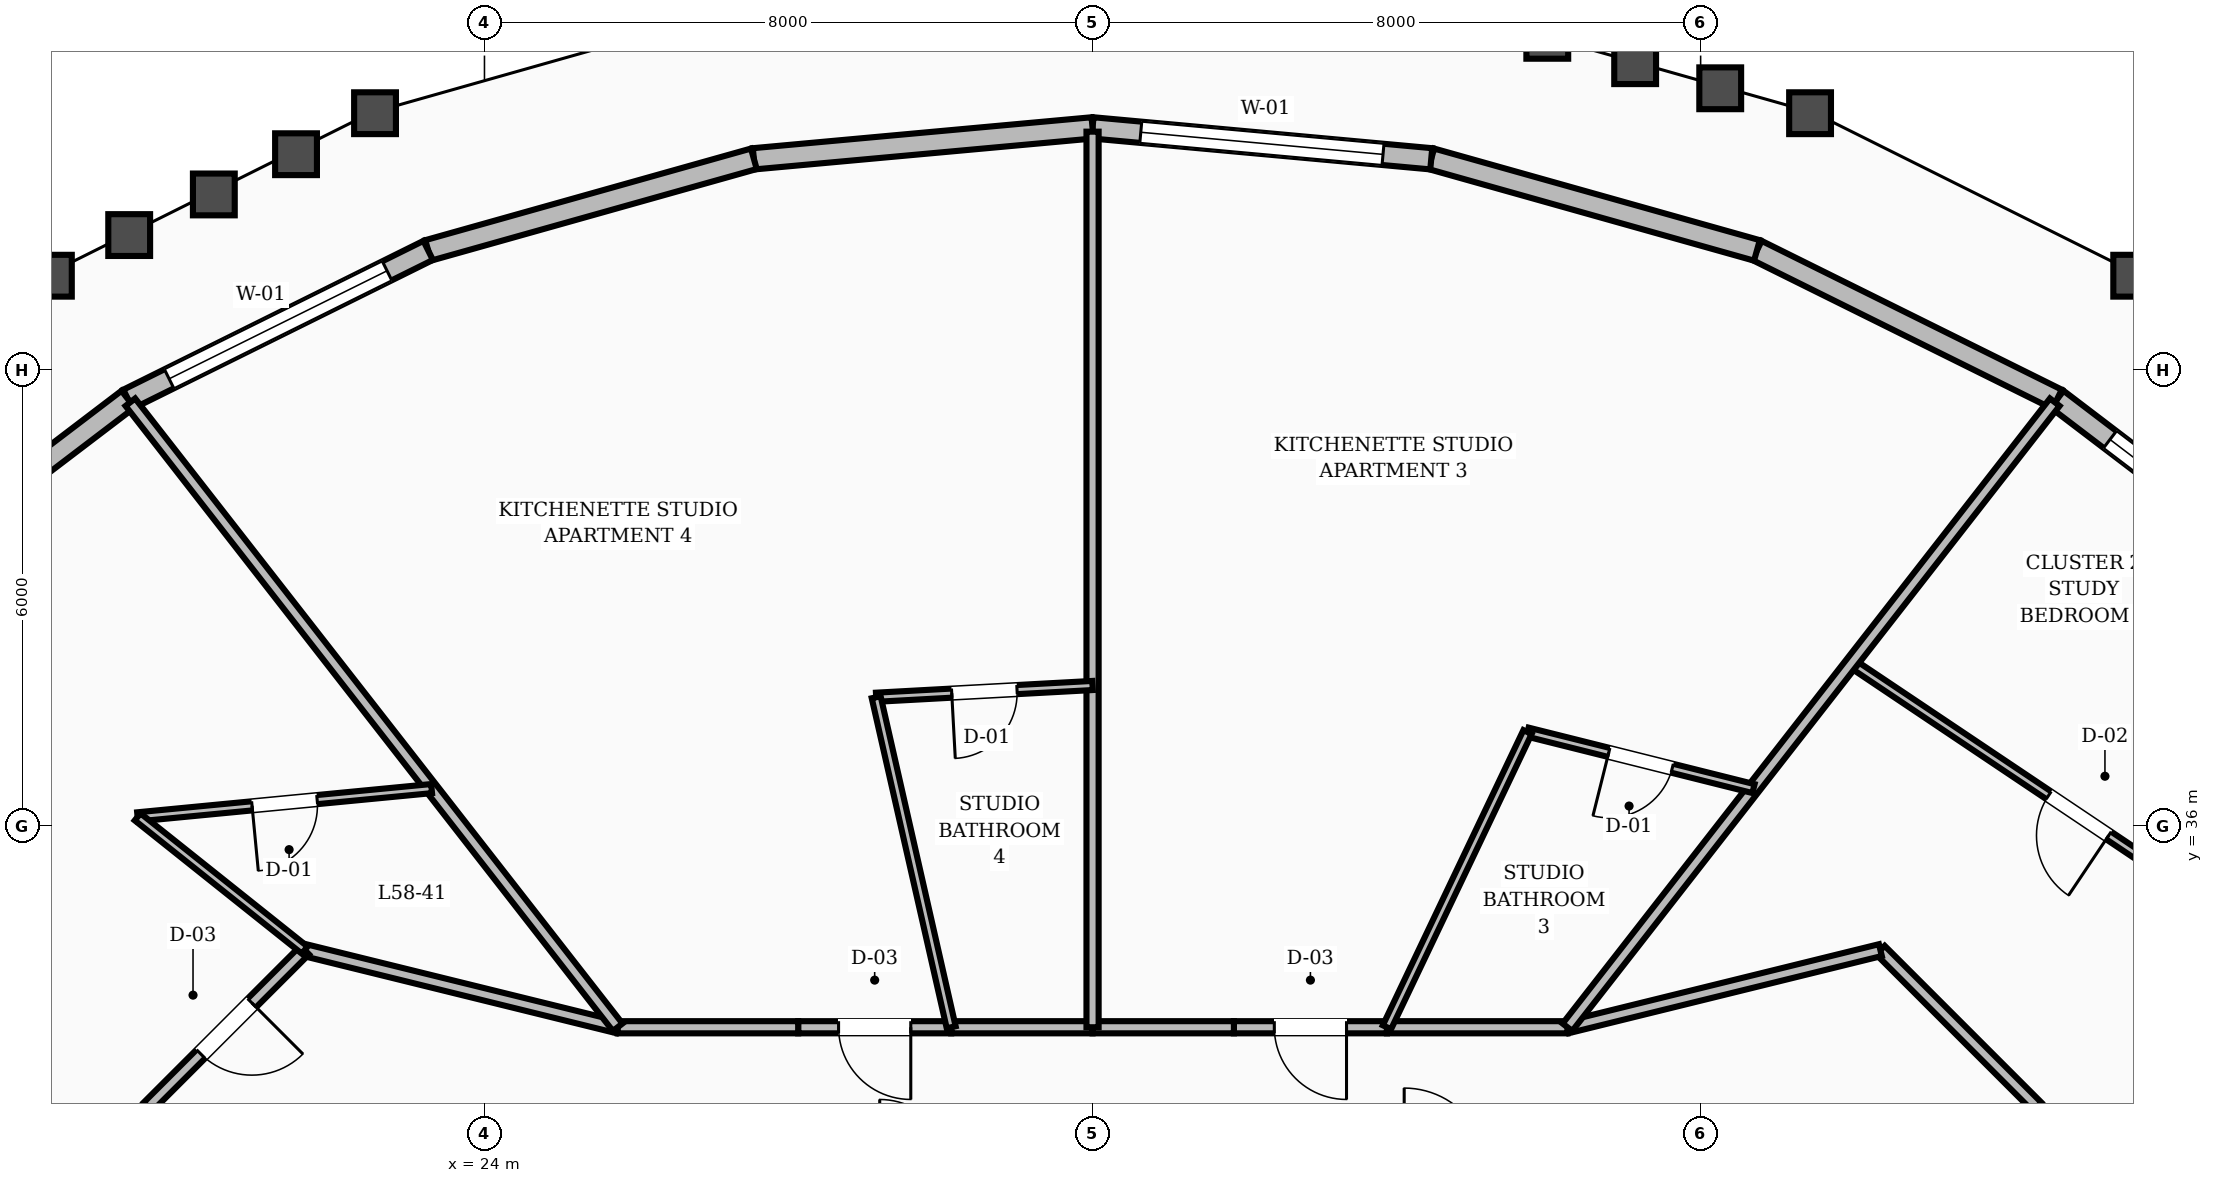
"""IFC4 building model, lengths in metres.
Left out: names, types, materials, properties, quantities, classifications, styles, units other than length and angle.
Written with IfcOpenShell. Run it as: python <this file> out.ifc"""

import sys

from ifc_helpers import new_model, si_unit, direction, frame, frame_2d, origin, place, context, subcontext, project, spatial, rectangle, extrude, element, fill, save


model = new_model("IFC4")
c1 = context("Model", 3, precision=1e-05, world=origin(), true_north=direction((0.0, 1.0)))
c2 = subcontext(c1, "Body", "Model", "MODEL_VIEW")
j1 = project(units=[si_unit("LENGTHUNIT", "METRE"), si_unit("PLANEANGLEUNIT", "RADIAN")], contexts=[c1])
p1 = place(None, origin())
s1 = spatial("IfcSite", under=j1, at=p1, CompositionType="ELEMENT")
p2 = place(p1, origin())
s2 = spatial("IfcBuilding", under=s1, at=p2, CompositionType="ELEMENT")
p3 = place(p2, frame((0.0, 0.0, 225.6)))
s3 = spatial("IfcBuildingStorey", under=s2, at=p3, CompositionType="ELEMENT", Elevation=225.6)
p4 = place(p3, frame((48.151, 38.978, 0.0), z_axis=(0.0, 0.0, 1.0), x_axis=(-0.795722836513, 0.605660934394, 0.0)))
e1 = element("IfcWall", 1, at=p4, inside=s3, PredefinedType="STANDARD", context=c2, shape_type="SweptSolid", body=[
    extrude(rectangle(XDim=4.349, YDim=0.28, at=frame_2d((2.175, 0.0))), origin(), (0.0, 0.0, 1.0), 2.88),
])
p5 = place(p4, frame((0.875, 0.0, 0.8)))
e2 = element("IfcOpeningElement", 2, at=p5, cuts=e1, PredefinedType="OPENING", context=c2, shape_type="SweptSolid", body=[
    extrude(rectangle(XDim=2.6, YDim=1.65, at=frame_2d((1.3, 0.825))), frame((0.0, 0.15, 0.0), z_axis=(0.0, -1.0, 0.0), x_axis=(1.0, 0.0, 0.0)), (0.0, 0.0, 1.0), 0.3),
])
p6 = place(p3, frame((44.69, 41.613, 0.0), z_axis=(0.0, 0.0, 1.0), x_axis=(-0.89596177971, 0.44413116227, 0.0)))
e3 = element("IfcWall", 3, at=p6, inside=s3, PredefinedType="STANDARD", context=c2, shape_type="SweptSolid", body=[
    extrude(rectangle(XDim=4.407, YDim=0.28, at=frame_2d((2.204, 0.0))), origin(), (0.0, 0.0, 1.0), 2.88),
])
p7 = place(p3, frame((40.741, 43.57, 0.0), z_axis=(0.0, 0.0, 1.0), x_axis=(-0.96263574912, 0.27079958367, 0.0)))
e4 = element("IfcWall", 4, at=p7, inside=s3, PredefinedType="STANDARD", context=c2, shape_type="SweptSolid", body=[
    extrude(rectangle(XDim=4.451, YDim=0.28, at=frame_2d((2.226, 0.0))), origin(), (0.0, 0.0, 1.0), 2.88),
])
p8 = place(p3, frame((36.456, 44.775, 0.0), z_axis=(0.0, 0.0, 1.0), x_axis=(-0.995855104574, 0.090953893235, 0.0)))
e5 = element("IfcWall", 5, at=p8, inside=s3, PredefinedType="STANDARD", context=c2, shape_type="SweptSolid", body=[
    extrude(rectangle(XDim=4.475, YDim=0.28, at=frame_2d((2.237, 0.0))), origin(), (0.0, 0.0, 1.0), 2.88),
])
p9 = place(p8, frame((0.637, 0.0, 0.8)))
e6 = element("IfcOpeningElement", 6, at=p9, cuts=e5, PredefinedType="OPENING", context=c2, shape_type="SweptSolid", body=[
    extrude(rectangle(XDim=3.2, YDim=1.65, at=frame_2d((1.6, 0.825))), frame((0.0, 0.15, 0.0), z_axis=(0.0, -1.0, 0.0), x_axis=(1.0, 0.0, 0.0)), (0.0, 0.0, 1.0), 0.3),
])
p10 = place(p3, frame((32.0, 45.182, 0.0), z_axis=(0.0, 0.0, 1.0), x_axis=(-0.995855104574, -0.090953893235, 0.0)))
e7 = element("IfcWall", 7, at=p10, inside=s3, PredefinedType="STANDARD", context=c2, shape_type="SweptSolid", body=[
    extrude(rectangle(XDim=4.475, YDim=0.28, at=frame_2d((2.237, 0.0))), origin(), (0.0, 0.0, 1.0), 2.88),
])
p11 = place(p3, frame((27.544, 44.775, 0.0), z_axis=(0.0, 0.0, 1.0), x_axis=(-0.96263574912, -0.27079958367, 0.0)))
e8 = element("IfcWall", 8, at=p11, inside=s3, PredefinedType="STANDARD", context=c2, shape_type="SweptSolid", body=[
    extrude(rectangle(XDim=4.451, YDim=0.28, at=frame_2d((2.226, 0.0))), origin(), (0.0, 0.0, 1.0), 2.88),
])
p12 = place(p3, frame((23.259, 43.57, 0.0), z_axis=(0.0, 0.0, 1.0), x_axis=(-0.89596177971, -0.44413116227, 0.0)))
e9 = element("IfcWall", 9, at=p12, inside=s3, PredefinedType="STANDARD", context=c2, shape_type="SweptSolid", body=[
    extrude(rectangle(XDim=4.407, YDim=0.28, at=frame_2d((2.204, 0.0))), origin(), (0.0, 0.0, 1.0), 2.88),
])
p13 = place(p12, frame((0.604, 0.0, 0.8)))
e10 = element("IfcOpeningElement", 10, at=p13, cuts=e9, PredefinedType="OPENING", context=c2, shape_type="SweptSolid", body=[
    extrude(rectangle(XDim=3.2, YDim=1.65, at=frame_2d((1.6, 0.825))), frame((0.0, 0.15, 0.0), z_axis=(0.0, -1.0, 0.0), x_axis=(1.0, 0.0, 0.0)), (0.0, 0.0, 1.0), 0.3),
])
p14 = place(p3, frame((19.31, 41.613, 0.0), z_axis=(0.0, 0.0, 1.0), x_axis=(-0.795722836513, -0.605660934394, 0.0)))
e11 = element("IfcWall", 11, at=p14, inside=s3, PredefinedType="STANDARD", context=c2, shape_type="SweptSolid", body=[
    extrude(rectangle(XDim=4.349, YDim=0.28, at=frame_2d((2.175, 0.0))), origin(), (0.0, 0.0, 1.0), 2.88),
])
p15 = place(p3, frame((44.427, 32.303, 0.0), z_axis=(0.0, 0.0, 1.0), x_axis=(-0.707106781187, 0.707106781187, 0.0)))
e12 = element("IfcWall", 12, at=p15, inside=s3, PredefinedType="SOLIDWALL", context=c2, shape_type="SweptSolid", body=[
    extrude(rectangle(XDim=2.916, YDim=0.16, at=frame_2d((1.458, 0.0))), origin(), (0.0, 0.0, 1.0), 2.87),
])
p16 = place(p3, frame((42.365, 34.365, 0.0), z_axis=(0.0, 0.0, 1.0), x_axis=(-0.970939799552, -0.239323850978, 0.0)))
e13 = element("IfcWall", 13, at=p16, inside=s3, PredefinedType="SOLIDWALL", context=c2, shape_type="SweptSolid", body=[
    extrude(rectangle(XDim=4.241, YDim=0.16, at=frame_2d((2.12, 0.0))), origin(), (0.0, 0.0, 1.0), 2.87),
])
p17 = place(p3, frame((38.248, 33.35, 0.0), z_axis=(0.0, 0.0, 1.0), x_axis=(-1.0, 0.0, 0.0)))
e14 = element("IfcWall", 14, at=p17, inside=s3, PredefinedType="SOLIDWALL", context=c2, shape_type="SweptSolid", body=[
    extrude(rectangle(XDim=2.375, YDim=0.16, at=frame_2d((1.188, 0.0))), origin(), (0.0, 0.0, 1.0), 2.87),
])
p18 = place(p3, frame((35.873, 33.35, 0.0), z_axis=(0.0, 0.0, 1.0), x_axis=(-1.0, 0.0, 0.0)))
e15 = element("IfcWall", 15, at=p18, inside=s3, PredefinedType="SOLIDWALL", context=c2, shape_type="SweptSolid", body=[
    extrude(rectangle(XDim=2.013, YDim=0.16, at=frame_2d((1.006, 0.0))), origin(), (0.0, 0.0, 1.0), 2.87),
])
p19 = place(p18, frame((0.531, 0.0, 0.0)))
e16 = element("IfcOpeningElement", 16, at=p19, cuts=e15, PredefinedType="OPENING", context=c2, shape_type="SweptSolid", body=[
    extrude(rectangle(XDim=0.95, YDim=2.1, at=frame_2d((0.475, 1.05))), frame((0.0, 0.09, 0.0), z_axis=(0.0, -1.0, 0.0), x_axis=(1.0, 0.0, 0.0)), (0.0, 0.0, 1.0), 0.18),
])
for number, where, z_axis, x_axis in (
    (17, (33.86, 33.35, 0.0), (0.0, 0.0, 1.0), (-1.0, 0.0, 0.0)),
    (18, (32.0, 33.35, 0.0), (0.0, 0.0, 1.0), (-1.0, 0.0, 0.0)),
):
    element("IfcWall", number, at=place(p3, frame(where, z_axis=z_axis, x_axis=x_axis)), inside=s3, PredefinedType="SOLIDWALL", context=c2, shape_type="SweptSolid", body=[
        extrude(rectangle(XDim=1.86, YDim=0.16, at=frame_2d((0.93, 0.0))), origin(), (0.0, 0.0, 1.0), 2.87),
    ])
p20 = place(p3, frame((30.14, 33.35, 0.0), z_axis=(0.0, 0.0, 1.0), x_axis=(-1.0, 0.0, 0.0)))
e19 = element("IfcWall", 19, at=p20, inside=s3, PredefinedType="SOLIDWALL", context=c2, shape_type="SweptSolid", body=[
    extrude(rectangle(XDim=2.013, YDim=0.16, at=frame_2d((1.006, 0.0))), origin(), (0.0, 0.0, 1.0), 2.87),
])
p21 = place(p20, frame((0.531, 0.0, 0.0)))
e20 = element("IfcOpeningElement", 20, at=p21, cuts=e19, PredefinedType="OPENING", context=c2, shape_type="SweptSolid", body=[
    extrude(rectangle(XDim=0.95, YDim=2.1, at=frame_2d((0.475, 1.05))), frame((0.0, 0.09, 0.0), z_axis=(0.0, -1.0, 0.0), x_axis=(1.0, 0.0, 0.0)), (0.0, 0.0, 1.0), 0.18),
])
p22 = place(p3, frame((28.127, 33.35, 0.0), z_axis=(0.0, 0.0, 1.0), x_axis=(-1.0, 0.0, 0.0)))
e21 = element("IfcWall", 21, at=p22, inside=s3, PredefinedType="SOLIDWALL", context=c2, shape_type="SweptSolid", body=[
    extrude(rectangle(XDim=2.375, YDim=0.16, at=frame_2d((1.188, 0.0))), origin(), (0.0, 0.0, 1.0), 2.87),
])
p23 = place(p3, frame((25.752, 33.35, 0.0), z_axis=(0.0, 0.0, 1.0), x_axis=(-0.970939799552, 0.239323850978, 0.0)))
e22 = element("IfcWall", 22, at=p23, inside=s3, PredefinedType="SOLIDWALL", context=c2, shape_type="SweptSolid", body=[
    extrude(rectangle(XDim=4.241, YDim=0.16, at=frame_2d((2.12, 0.0))), origin(), (0.0, 0.0, 1.0), 2.87),
])
p24 = place(p3, frame((21.635, 34.365, 0.0), z_axis=(0.0, 0.0, 1.0), x_axis=(-0.707106781187, -0.707106781187, 0.0)))
e23 = element("IfcWall", 23, at=p24, inside=s3, PredefinedType="SOLIDWALL", context=c2, shape_type="SweptSolid", body=[
    extrude(rectangle(XDim=2.916, YDim=0.16, at=frame_2d((1.458, 0.0))), origin(), (0.0, 0.0, 1.0), 2.87),
])
p25 = place(p24, frame((0.983, 0.0, 0.0)))
e24 = element("IfcOpeningElement", 24, at=p25, cuts=e23, PredefinedType="OPENING", context=c2, shape_type="SweptSolid", body=[
    extrude(rectangle(XDim=0.95, YDim=2.1, at=frame_2d((0.475, 1.05))), frame((0.0, 0.09, 0.0), z_axis=(0.0, -1.0, 0.0), x_axis=(1.0, 0.0, 0.0)), (0.0, 0.0, 1.0), 0.18),
])
p26 = place(p3, frame((47.964, 34.133, 0.0), z_axis=(0.0, 0.0, 1.0), x_axis=(-0.830591967255, 0.556881481046, 0.0)))
e25 = element("IfcWall", 25, at=p26, inside=s3, PredefinedType="PARTITIONING", context=c2, shape_type="SweptSolid", body=[
    extrude(rectangle(XDim=7.2, YDim=0.12, at=frame_2d((3.6, 0.0))), origin(), (0.0, 0.0, 1.0), 2.87),
])
p27 = place(p26, frame((3.125, 0.0, 0.0)))
e26 = element("IfcOpeningElement", 26, at=p27, cuts=e25, PredefinedType="OPENING", context=c2, shape_type="SweptSolid", body=[
    extrude(rectangle(XDim=0.95, YDim=2.1, at=frame_2d((0.475, 1.05))), frame((0.0, 0.07, 0.0), z_axis=(0.0, -1.0, 0.0), x_axis=(1.0, 0.0, 0.0)), (0.0, 0.0, 1.0), 0.14),
])
p28 = place(p3, frame((38.248, 33.35, 0.0), z_axis=(0.0, 0.0, 1.0), x_axis=(0.614883592215, 0.788617884672, 0.0)))
e27 = element("IfcWall", 27, at=p28, inside=s3, PredefinedType="SOLIDWALL", context=c2, shape_type="SweptSolid", body=[
    extrude(rectangle(XDim=10.427, YDim=0.16, at=frame_2d((5.213, 0.0))), origin(), (0.0, 0.0, 1.0), 2.87),
])
p29 = place(p3, frame((40.696, 36.49, 0.0), z_axis=(0.0, 0.0, 1.0), x_axis=(-0.970090929749, 0.242741813496, 0.0)))
e28 = element("IfcWall", 28, at=p29, inside=s3, PredefinedType="PARTITIONING", context=c2, shape_type="SweptSolid", body=[
    extrude(rectangle(XDim=3.064, YDim=0.12, at=frame_2d((1.532, 0.0))), origin(), (0.0, 0.0, 1.0), 2.87),
])
p30 = place(p29, frame((1.102, 0.0, 0.0)))
e29 = element("IfcOpeningElement", 29, at=p30, cuts=e28, PredefinedType="OPENING", context=c2, shape_type="SweptSolid", body=[
    extrude(rectangle(XDim=0.86, YDim=2.1, at=frame_2d((0.43, 1.05))), frame((0.0, 0.07, 0.0), z_axis=(0.0, -1.0, 0.0), x_axis=(1.0, 0.0, 0.0)), (0.0, 0.0, 1.0), 0.14),
])
p31 = place(p3, frame((35.873, 33.35, 0.0), z_axis=(0.0, 0.0, 1.0), x_axis=(0.430037122425, 0.90281120581, 0.0)))
e30 = element("IfcWall", 30, at=p31, inside=s3, PredefinedType="PARTITIONING", context=c2, shape_type="SweptSolid", body=[
    extrude(rectangle(XDim=4.302, YDim=0.12, at=frame_2d((2.151, 0.0))), origin(), (0.0, 0.0, 1.0), 2.87),
])
p32 = place(p3, frame((32.0, 33.35, 0.0), z_axis=(0.0, 0.0, 1.0), x_axis=(0.0, 1.0, 0.0)))
e31 = element("IfcWall", 31, at=p32, inside=s3, PredefinedType="SOLIDWALL", context=c2, shape_type="SweptSolid", body=[
    extrude(rectangle(XDim=11.782, YDim=0.16, at=frame_2d((5.891, 0.0))), origin(), (0.0, 0.0, 1.0), 2.87),
])
p33 = place(p3, frame((32.0, 37.846, 0.0), z_axis=(0.0, 0.0, 1.0), x_axis=(-0.998529395185, -0.054212977713, 0.0)))
e32 = element("IfcWall", 32, at=p33, inside=s3, PredefinedType="PARTITIONING", context=c2, shape_type="SweptSolid", body=[
    extrude(rectangle(XDim=2.851, YDim=0.12, at=frame_2d((1.425, 0.0))), origin(), (0.0, 0.0, 1.0), 2.87),
])
p34 = place(p33, frame((0.995, 0.0, 0.0)))
e33 = element("IfcOpeningElement", 33, at=p34, cuts=e32, PredefinedType="OPENING", context=c2, shape_type="SweptSolid", body=[
    extrude(rectangle(XDim=0.86, YDim=2.1, at=frame_2d((0.43, 1.05))), frame((0.0, 0.07, 0.0), z_axis=(0.0, -1.0, 0.0), x_axis=(1.0, 0.0, 0.0)), (0.0, 0.0, 1.0), 0.14),
])
p35 = place(p3, frame((30.14, 33.35, 0.0), z_axis=(0.0, 0.0, 1.0), x_axis=(-0.221590292171, 0.975139857875, 0.0)))
e34 = element("IfcWall", 34, at=p35, inside=s3, PredefinedType="PARTITIONING", context=c2, shape_type="SweptSolid", body=[
    extrude(rectangle(XDim=4.452, YDim=0.12, at=frame_2d((2.226, 0.0))), origin(), (0.0, 0.0, 1.0), 2.87),
])
p36 = place(p3, frame((25.752, 33.35, 0.0), z_axis=(0.0, 0.0, 1.0), x_axis=(-0.614883592215, 0.788617884672, 0.0)))
e35 = element("IfcWall", 35, at=p36, inside=s3, PredefinedType="SOLIDWALL", context=c2, shape_type="SweptSolid", body=[
    extrude(rectangle(XDim=10.427, YDim=0.16, at=frame_2d((5.213, 0.0))), origin(), (0.0, 0.0, 1.0), 2.87),
])
p37 = place(p3, frame((23.304, 36.49, 0.0), z_axis=(0.0, 0.0, 1.0), x_axis=(-0.995411791271, -0.09568367572, 0.0)))
e36 = element("IfcWall", 36, at=p37, inside=s3, PredefinedType="PARTITIONING", context=c2, shape_type="SweptSolid", body=[
    extrude(rectangle(XDim=3.886, YDim=0.12, at=frame_2d((1.943, 0.0))), origin(), (0.0, 0.0, 1.0), 2.87),
])
p38 = place(p37, frame((1.513, 0.0, 0.0)))
e37 = element("IfcOpeningElement", 37, at=p38, cuts=e36, PredefinedType="OPENING", context=c2, shape_type="SweptSolid", body=[
    extrude(rectangle(XDim=0.86, YDim=2.1, at=frame_2d((0.43, 1.05))), frame((0.0, 0.07, 0.0), z_axis=(0.0, -1.0, 0.0), x_axis=(1.0, 0.0, 0.0)), (0.0, 0.0, 1.0), 0.14),
])
p39 = place(p3, frame((21.635, 34.365, 0.0), z_axis=(0.0, 0.0, 1.0), x_axis=(-0.781918038943, 0.623381248014, 0.0)))
e38 = element("IfcWall", 38, at=p39, inside=s3, PredefinedType="PARTITIONING", context=c2, shape_type="SweptSolid", body=[
    extrude(rectangle(XDim=2.812, YDim=0.12, at=frame_2d((1.406, 0.0))), origin(), (0.0, 0.0, 1.0), 2.87),
])
p40 = place(p5, origin())
e39 = element("IfcWindow", 39, at=p40, inside=s3, PartitioningType="SINGLE_PANEL", PredefinedType="WINDOW", context=c2, shape_type="SweptSolid", body=[
    extrude(rectangle(XDim=2.6, YDim=1.65, at=frame_2d((1.3, 0.825))), frame((0.0, 0.03, 0.0), z_axis=(0.0, -1.0, 0.0), x_axis=(1.0, 0.0, 0.0)), (0.0, 0.0, 1.0), 0.06),
])
fill(e2, e39)
p41 = place(p9, origin())
e40 = element("IfcWindow", 40, at=p41, inside=s3, PartitioningType="SINGLE_PANEL", PredefinedType="WINDOW", context=c2, shape_type="SweptSolid", body=[
    extrude(rectangle(XDim=3.2, YDim=1.65, at=frame_2d((1.6, 0.825))), frame((0.0, 0.03, 0.0), z_axis=(0.0, -1.0, 0.0), x_axis=(1.0, 0.0, 0.0)), (0.0, 0.0, 1.0), 0.06),
])
fill(e6, e40)
p42 = place(p13, origin())
e41 = element("IfcWindow", 41, at=p42, inside=s3, PartitioningType="SINGLE_PANEL", PredefinedType="WINDOW", context=c2, shape_type="SweptSolid", body=[
    extrude(rectangle(XDim=3.2, YDim=1.65, at=frame_2d((1.6, 0.825))), frame((0.0, 0.03, 0.0), z_axis=(0.0, -1.0, 0.0), x_axis=(1.0, 0.0, 0.0)), (0.0, 0.0, 1.0), 0.06),
])
fill(e10, e41)
p43 = place(p27, origin())
e42 = element("IfcDoor", 42, at=p43, inside=s3, OperationType="SINGLE_SWING_LEFT", PredefinedType="DOOR", context=c2, shape_type="SweptSolid", body=[
    extrude(rectangle(XDim=0.95, YDim=2.1, at=frame_2d((0.475, 1.05))), frame((0.0, 0.025, 0.0), z_axis=(0.0, -1.0, 0.0), x_axis=(1.0, 0.0, 0.0)), (0.0, 0.0, 1.0), 0.05),
])
fill(e26, e42)
p44 = place(p30, origin())
e43 = element("IfcDoor", 43, at=p44, inside=s3, OperationType="SINGLE_SWING_RIGHT", PredefinedType="DOOR", context=c2, shape_type="SweptSolid", body=[
    extrude(rectangle(XDim=0.86, YDim=2.1, at=frame_2d((0.43, 1.05))), frame((0.0, 0.025, 0.0), z_axis=(0.0, -1.0, 0.0), x_axis=(1.0, 0.0, 0.0)), (0.0, 0.0, 1.0), 0.05),
])
fill(e29, e43)
p45 = place(p19, origin())
e44 = element("IfcDoor", 44, at=p45, inside=s3, OperationType="SINGLE_SWING_LEFT", PredefinedType="DOOR", context=c2, shape_type="SweptSolid", body=[
    extrude(rectangle(XDim=0.95, YDim=2.1, at=frame_2d((0.475, 1.05))), frame((0.0, 0.025, 0.0), z_axis=(0.0, -1.0, 0.0), x_axis=(1.0, 0.0, 0.0)), (0.0, 0.0, 1.0), 0.05),
])
fill(e16, e44)
p46 = place(p34, origin())
e45 = element("IfcDoor", 45, at=p46, inside=s3, OperationType="SINGLE_SWING_RIGHT", PredefinedType="DOOR", context=c2, shape_type="SweptSolid", body=[
    extrude(rectangle(XDim=0.86, YDim=2.1, at=frame_2d((0.43, 1.05))), frame((0.0, 0.025, 0.0), z_axis=(0.0, -1.0, 0.0), x_axis=(1.0, 0.0, 0.0)), (0.0, 0.0, 1.0), 0.05),
])
fill(e33, e45)
p47 = place(p21, origin())
e46 = element("IfcDoor", 46, at=p47, inside=s3, OperationType="SINGLE_SWING_LEFT", PredefinedType="DOOR", context=c2, shape_type="SweptSolid", body=[
    extrude(rectangle(XDim=0.95, YDim=2.1, at=frame_2d((0.475, 1.05))), frame((0.0, 0.025, 0.0), z_axis=(0.0, -1.0, 0.0), x_axis=(1.0, 0.0, 0.0)), (0.0, 0.0, 1.0), 0.05),
])
fill(e20, e46)
p48 = place(p38, origin())
e47 = element("IfcDoor", 47, at=p48, inside=s3, OperationType="SINGLE_SWING_RIGHT", PredefinedType="DOOR", context=c2, shape_type="SweptSolid", body=[
    extrude(rectangle(XDim=0.86, YDim=2.1, at=frame_2d((0.43, 1.05))), frame((0.0, 0.025, 0.0), z_axis=(0.0, -1.0, 0.0), x_axis=(1.0, 0.0, 0.0)), (0.0, 0.0, 1.0), 0.05),
])
fill(e37, e47)
p49 = place(p25, origin())
e48 = element("IfcDoor", 48, at=p49, inside=s3, OperationType="SINGLE_SWING_LEFT", PredefinedType="DOOR", context=c2, shape_type="SweptSolid", body=[
    extrude(rectangle(XDim=0.95, YDim=2.1, at=frame_2d((0.475, 1.05))), frame((0.0, 0.025, 0.0), z_axis=(0.0, -1.0, 0.0), x_axis=(1.0, 0.0, 0.0)), (0.0, 0.0, 1.0), 0.05),
])
fill(e24, e48)
save(model, sys.argv[1])
